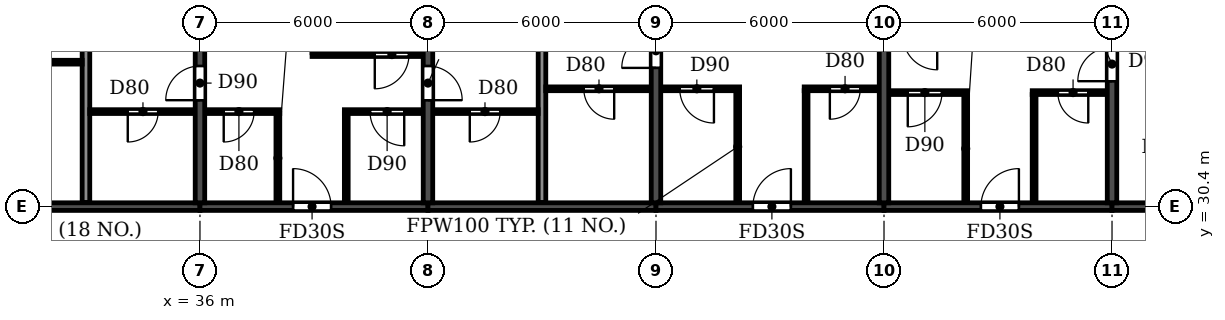
"""IFC4 building model, lengths in metres.
Left out: names, types, materials, properties, quantities, classifications, styles, units other than length and angle.
Written with IfcOpenShell. Run it as: python <this file> out.ifc"""

import sys

from ifc_helpers import new_model, si_unit, direction, frame, frame_2d, origin, place, context, subcontext, project, spatial, rectangle, extrude, element, fill, save


model = new_model("IFC4")
c1 = context("Model", 3, precision=1e-05, world=origin(), true_north=direction((0.0, 1.0)))
c2 = subcontext(c1, "Body", "Model", "MODEL_VIEW")
j1 = project(units=[si_unit("LENGTHUNIT", "METRE"), si_unit("PLANEANGLEUNIT", "RADIAN")], contexts=[c1])
p1 = place(None, origin())
s1 = spatial("IfcSite", under=j1, at=p1, CompositionType="ELEMENT")
p2 = place(p1, origin())
s2 = spatial("IfcBuilding", under=s1, at=p2, CompositionType="ELEMENT")
p3 = place(p2, frame((0.0, 0.0, 171.9)))
s3 = spatial("IfcBuildingStorey", under=s2, at=p3, CompositionType="ELEMENT", Elevation=171.9)
p4 = place(p3, frame((36.0, 30.5, 0.0), z_axis=(0.0, 0.0, 1.0), x_axis=(0.0, 1.0, 0.0)))
e1 = element("IfcWall", 1, at=p4, inside=s3, PredefinedType="SHEAR", context=c2, shape_type="SweptSolid", body=[
    extrude(rectangle(XDim=10.5, YDim=0.25, at=frame_2d((5.25, 0.0))), origin(), (0.0, 0.0, 1.0), 3.08),
])
p5 = place(p4, frame((2.7, 0.0, 0.0)))
e2 = element("IfcOpeningElement", 2, at=p5, cuts=e1, PredefinedType="OPENING", context=c2, shape_type="SweptSolid", body=[
    extrude(rectangle(XDim=0.9, YDim=2.1, at=frame_2d((0.45, 1.05))), frame((0.0, 0.135, 0.0), z_axis=(0.0, -1.0, 0.0), x_axis=(1.0, 0.0, 0.0)), (0.0, 0.0, 1.0), 0.27),
])
p6 = place(p3, frame((42.0, 30.5, 0.0), z_axis=(0.0, 0.0, 1.0), x_axis=(0.0, 1.0, 0.0)))
e3 = element("IfcWall", 3, at=p6, inside=s3, PredefinedType="SHEAR", context=c2, shape_type="SweptSolid", body=[
    extrude(rectangle(XDim=10.5, YDim=0.25, at=frame_2d((5.25, 0.0))), origin(), (0.0, 0.0, 1.0), 3.08),
])
p7 = place(p6, frame((2.7, 0.0, 0.0)))
e4 = element("IfcOpeningElement", 4, at=p7, cuts=e3, PredefinedType="OPENING", context=c2, shape_type="SweptSolid", body=[
    extrude(rectangle(XDim=0.9, YDim=2.1, at=frame_2d((0.45, 1.05))), frame((0.0, 0.135, 0.0), z_axis=(0.0, -1.0, 0.0), x_axis=(1.0, 0.0, 0.0)), (0.0, 0.0, 1.0), 0.27),
])
p8 = place(p3, frame((48.0, 30.5, 0.0), z_axis=(0.0, 0.0, 1.0), x_axis=(0.0, 1.0, 0.0)))
e5 = element("IfcWall", 5, at=p8, inside=s3, PredefinedType="SHEAR", context=c2, shape_type="SweptSolid", body=[
    extrude(rectangle(XDim=10.5, YDim=0.25, at=frame_2d((5.25, 0.0))), origin(), (0.0, 0.0, 1.0), 3.08),
])
p9 = place(p8, frame((3.55, 0.0, 0.0)))
e6 = element("IfcOpeningElement", 6, at=p9, cuts=e5, PredefinedType="OPENING", context=c2, shape_type="SweptSolid", body=[
    extrude(rectangle(XDim=0.9, YDim=2.1, at=frame_2d((0.45, 1.05))), frame((0.0, 0.135, 0.0), z_axis=(0.0, -1.0, 0.0), x_axis=(1.0, 0.0, 0.0)), (0.0, 0.0, 1.0), 0.27),
])
p10 = place(p3, frame((54.0, 30.5, 0.0), z_axis=(0.0, 0.0, 1.0), x_axis=(0.0, 1.0, 0.0)))
e7 = element("IfcWall", 7, at=p10, inside=s3, PredefinedType="SHEAR", context=c2, shape_type="SweptSolid", body=[
    extrude(rectangle(XDim=10.5, YDim=0.25, at=frame_2d((5.25, 0.0))), origin(), (0.0, 0.0, 1.0), 3.08),
])
p11 = place(p3, frame((60.0, 30.5, 0.0), z_axis=(0.0, 0.0, 1.0), x_axis=(0.0, 1.0, 0.0)))
e8 = element("IfcWall", 8, at=p11, inside=s3, PredefinedType="SHEAR", context=c2, shape_type="SweptSolid", body=[
    extrude(rectangle(XDim=10.5, YDim=0.25, at=frame_2d((5.25, 0.0))), origin(), (0.0, 0.0, 1.0), 3.08),
])
p12 = place(p11, frame((3.2, 0.0, 0.0)))
e9 = element("IfcOpeningElement", 9, at=p12, cuts=e8, PredefinedType="OPENING", context=c2, shape_type="SweptSolid", body=[
    extrude(rectangle(XDim=0.9, YDim=2.1, at=frame_2d((0.45, 1.05))), frame((0.0, 0.135, 0.0), z_axis=(0.0, -1.0, 0.0), x_axis=(1.0, 0.0, 0.0)), (0.0, 0.0, 1.0), 0.27),
])
p13 = place(p3, frame((30.0, 30.4, 0.0), z_axis=(0.0, 0.0, 1.0), x_axis=(1.0, 0.0, 0.0)))
e10 = element("IfcWall", 10, at=p13, inside=s3, PredefinedType="SHEAR", context=c2, shape_type="SweptSolid", body=[
    extrude(rectangle(XDim=6.0, YDim=0.2, at=frame_2d((3.0, 0.0))), origin(), (0.0, 0.0, 1.0), 2.48),
])
p14 = place(p3, frame((36.0, 30.4, 0.0), z_axis=(0.0, 0.0, 1.0), x_axis=(1.0, 0.0, 0.0)))
e11 = element("IfcWall", 11, at=p14, inside=s3, PredefinedType="SHEAR", context=c2, shape_type="SweptSolid", body=[
    extrude(rectangle(XDim=6.0, YDim=0.2, at=frame_2d((3.0, 0.0))), origin(), (0.0, 0.0, 1.0), 2.48),
])
p15 = place(p14, frame((2.45, 0.0, 0.0)))
e12 = element("IfcOpeningElement", 12, at=p15, cuts=e11, PredefinedType="OPENING", context=c2, shape_type="SweptSolid", body=[
    extrude(rectangle(XDim=1.0, YDim=2.1, at=frame_2d((0.5, 1.05))), frame((0.0, 0.11, 0.0), z_axis=(0.0, -1.0, 0.0), x_axis=(1.0, 0.0, 0.0)), (0.0, 0.0, 1.0), 0.22),
])
p16 = place(p3, frame((42.0, 30.4, 0.0), z_axis=(0.0, 0.0, 1.0), x_axis=(1.0, 0.0, 0.0)))
e13 = element("IfcWall", 13, at=p16, inside=s3, PredefinedType="SHEAR", context=c2, shape_type="SweptSolid", body=[
    extrude(rectangle(XDim=6.0, YDim=0.2, at=frame_2d((3.0, 0.0))), origin(), (0.0, 0.0, 1.0), 2.48),
])
p17 = place(p3, frame((48.0, 30.4, 0.0), z_axis=(0.0, 0.0, 1.0), x_axis=(1.0, 0.0, 0.0)))
e14 = element("IfcWall", 14, at=p17, inside=s3, PredefinedType="SHEAR", context=c2, shape_type="SweptSolid", body=[
    extrude(rectangle(XDim=6.0, YDim=0.2, at=frame_2d((3.0, 0.0))), origin(), (0.0, 0.0, 1.0), 2.48),
])
p18 = place(p17, frame((2.55, 0.0, 0.0)))
e15 = element("IfcOpeningElement", 15, at=p18, cuts=e14, PredefinedType="OPENING", context=c2, shape_type="SweptSolid", body=[
    extrude(rectangle(XDim=1.0, YDim=2.1, at=frame_2d((0.5, 1.05))), frame((0.0, 0.11, 0.0), z_axis=(0.0, -1.0, 0.0), x_axis=(1.0, 0.0, 0.0)), (0.0, 0.0, 1.0), 0.22),
])
p19 = place(p3, frame((54.0, 30.4, 0.0), z_axis=(0.0, 0.0, 1.0), x_axis=(1.0, 0.0, 0.0)))
e16 = element("IfcWall", 16, at=p19, inside=s3, PredefinedType="SHEAR", context=c2, shape_type="SweptSolid", body=[
    extrude(rectangle(XDim=6.0, YDim=0.2, at=frame_2d((3.0, 0.0))), origin(), (0.0, 0.0, 1.0), 2.48),
])
p20 = place(p19, frame((2.55, 0.0, 0.0)))
e17 = element("IfcOpeningElement", 17, at=p20, cuts=e16, PredefinedType="OPENING", context=c2, shape_type="SweptSolid", body=[
    extrude(rectangle(XDim=1.0, YDim=2.1, at=frame_2d((0.5, 1.05))), frame((0.0, 0.11, 0.0), z_axis=(0.0, -1.0, 0.0), x_axis=(1.0, 0.0, 0.0)), (0.0, 0.0, 1.0), 0.22),
])
p21 = place(p3, frame((60.0, 30.4, 0.0), z_axis=(0.0, 0.0, 1.0), x_axis=(1.0, 0.0, 0.0)))
e18 = element("IfcWall", 18, at=p21, inside=s3, PredefinedType="SHEAR", context=c2, shape_type="SweptSolid", body=[
    extrude(rectangle(XDim=6.0, YDim=0.2, at=frame_2d((3.0, 0.0))), origin(), (0.0, 0.0, 1.0), 2.48),
])
for number, where, z_axis, x_axis in (
    (19, (33.0, 30.51, 0.0), (0.0, 0.0, 1.0), (0.0, 1.0, 0.0)),
    (20, (45.0, 30.51, 0.0), (0.0, 0.0, 1.0), (0.0, 1.0, 0.0)),
):
    element("IfcWall", number, at=place(p3, frame(where, z_axis=z_axis, x_axis=x_axis)), inside=s3, PredefinedType="PARTITIONING", context=c2, shape_type="SweptSolid", body=[
        extrude(rectangle(XDim=10.63, YDim=0.2, at=frame_2d((5.315, 0.0))), origin(), (0.0, 0.0, 1.0), 3.08),
    ])
p22 = place(p3, frame((33.1, 32.9, 0.0), z_axis=(0.0, 0.0, 1.0), x_axis=(1.0, 0.0, 0.0)))
e21 = element("IfcWall", 21, at=p22, inside=s3, PredefinedType="PARTITIONING", context=c2, shape_type="SweptSolid", body=[
    extrude(rectangle(XDim=2.765, YDim=0.1, at=frame_2d((1.382, 0.0))), origin(), (0.0, 0.0, 1.0), 3.08),
])
p23 = place(p22, frame((1.0, 0.0, 0.0)))
e22 = element("IfcOpeningElement", 22, at=p23, cuts=e21, PredefinedType="OPENING", context=c2, shape_type="SweptSolid", body=[
    extrude(rectangle(XDim=0.8, YDim=2.1, at=frame_2d((0.4, 1.05))), frame((0.0, 0.06, 0.0), z_axis=(0.0, -1.0, 0.0), x_axis=(1.0, 0.0, 0.0)), (0.0, 0.0, 1.0), 0.12),
])
p24 = place(p3, frame((36.135, 32.9, 0.0), z_axis=(0.0, 0.0, 1.0), x_axis=(1.0, 0.0, 0.0)))
e23 = element("IfcWall", 23, at=p24, inside=s3, PredefinedType="PARTITIONING", context=c2, shape_type="SweptSolid", body=[
    extrude(rectangle(XDim=1.965, YDim=0.1, at=frame_2d((0.982, 0.0))), origin(), (0.0, 0.0, 1.0), 3.08),
])
p25 = place(p24, frame((0.49, 0.0, 0.0)))
e24 = element("IfcOpeningElement", 24, at=p25, cuts=e23, PredefinedType="OPENING", context=c2, shape_type="SweptSolid", body=[
    extrude(rectangle(XDim=0.8, YDim=2.1, at=frame_2d((0.4, 1.05))), frame((0.0, 0.06, 0.0), z_axis=(0.0, -1.0, 0.0), x_axis=(1.0, 0.0, 0.0)), (0.0, 0.0, 1.0), 0.12),
])
p26 = place(p3, frame((39.8, 32.9, 0.0), z_axis=(0.0, 0.0, 1.0), x_axis=(1.0, 0.0, 0.0)))
e25 = element("IfcWall", 25, at=p26, inside=s3, PredefinedType="PARTITIONING", context=c2, shape_type="SweptSolid", body=[
    extrude(rectangle(XDim=2.065, YDim=0.1, at=frame_2d((1.032, 0.0))), origin(), (0.0, 0.0, 1.0), 3.08),
])
p27 = place(p26, frame((0.675, 0.0, 0.0)))
e26 = element("IfcOpeningElement", 26, at=p27, cuts=e25, PredefinedType="OPENING", context=c2, shape_type="SweptSolid", body=[
    extrude(rectangle(XDim=0.9, YDim=2.1, at=frame_2d((0.45, 1.05))), frame((0.0, 0.06, 0.0), z_axis=(0.0, -1.0, 0.0), x_axis=(1.0, 0.0, 0.0)), (0.0, 0.0, 1.0), 0.12),
])
p28 = place(p3, frame((42.135, 32.9, 0.0), z_axis=(0.0, 0.0, 1.0), x_axis=(1.0, 0.0, 0.0)))
e27 = element("IfcWall", 27, at=p28, inside=s3, PredefinedType="PARTITIONING", context=c2, shape_type="SweptSolid", body=[
    extrude(rectangle(XDim=2.765, YDim=0.1, at=frame_2d((1.382, 0.0))), origin(), (0.0, 0.0, 1.0), 3.08),
])
p29 = place(p28, frame((0.965, 0.0, 0.0)))
e28 = element("IfcOpeningElement", 28, at=p29, cuts=e27, PredefinedType="OPENING", context=c2, shape_type="SweptSolid", body=[
    extrude(rectangle(XDim=0.8, YDim=2.1, at=frame_2d((0.4, 1.05))), frame((0.0, 0.06, 0.0), z_axis=(0.0, -1.0, 0.0), x_axis=(1.0, 0.0, 0.0)), (0.0, 0.0, 1.0), 0.12),
])
p30 = place(p3, frame((54.135, 33.4, 0.0), z_axis=(0.0, 0.0, 1.0), x_axis=(1.0, 0.0, 0.0)))
e29 = element("IfcWall", 29, at=p30, inside=s3, PredefinedType="PARTITIONING", context=c2, shape_type="SweptSolid", body=[
    extrude(rectangle(XDim=2.065, YDim=0.1, at=frame_2d((1.032, 0.0))), origin(), (0.0, 0.0, 1.0), 3.08),
])
p31 = place(p30, frame((0.49, 0.0, 0.0)))
e30 = element("IfcOpeningElement", 30, at=p31, cuts=e29, PredefinedType="OPENING", context=c2, shape_type="SweptSolid", body=[
    extrude(rectangle(XDim=0.9, YDim=2.1, at=frame_2d((0.45, 1.05))), frame((0.0, 0.06, 0.0), z_axis=(0.0, -1.0, 0.0), x_axis=(1.0, 0.0, 0.0)), (0.0, 0.0, 1.0), 0.12),
])
p32 = place(p3, frame((57.9, 33.4, 0.0), z_axis=(0.0, 0.0, 1.0), x_axis=(1.0, 0.0, 0.0)))
e31 = element("IfcWall", 31, at=p32, inside=s3, PredefinedType="PARTITIONING", context=c2, shape_type="SweptSolid", body=[
    extrude(rectangle(XDim=1.965, YDim=0.1, at=frame_2d((0.982, 0.0))), origin(), (0.0, 0.0, 1.0), 3.08),
])
p33 = place(p32, frame((0.675, 0.0, 0.0)))
e32 = element("IfcOpeningElement", 32, at=p33, cuts=e31, PredefinedType="OPENING", context=c2, shape_type="SweptSolid", body=[
    extrude(rectangle(XDim=0.8, YDim=2.1, at=frame_2d((0.4, 1.05))), frame((0.0, 0.06, 0.0), z_axis=(0.0, -1.0, 0.0), x_axis=(1.0, 0.0, 0.0)), (0.0, 0.0, 1.0), 0.12),
])
p34 = place(p3, frame((45.1, 33.5, 0.0), z_axis=(0.0, 0.0, 1.0), x_axis=(1.0, 0.0, 0.0)))
e33 = element("IfcWall", 33, at=p34, inside=s3, PredefinedType="PARTITIONING", context=c2, shape_type="SweptSolid", body=[
    extrude(rectangle(XDim=2.765, YDim=0.1, at=frame_2d((1.382, 0.0))), origin(), (0.0, 0.0, 1.0), 3.08),
])
p35 = place(p34, frame((1.0, 0.0, 0.0)))
e34 = element("IfcOpeningElement", 34, at=p35, cuts=e33, PredefinedType="OPENING", context=c2, shape_type="SweptSolid", body=[
    extrude(rectangle(XDim=0.8, YDim=2.1, at=frame_2d((0.4, 1.05))), frame((0.0, 0.06, 0.0), z_axis=(0.0, -1.0, 0.0), x_axis=(1.0, 0.0, 0.0)), (0.0, 0.0, 1.0), 0.12),
])
p36 = place(p3, frame((48.135, 33.5, 0.0), z_axis=(0.0, 0.0, 1.0), x_axis=(1.0, 0.0, 0.0)))
e35 = element("IfcWall", 35, at=p36, inside=s3, PredefinedType="PARTITIONING", context=c2, shape_type="SweptSolid", body=[
    extrude(rectangle(XDim=2.065, YDim=0.1, at=frame_2d((1.032, 0.0))), origin(), (0.0, 0.0, 1.0), 3.08),
])
p37 = place(p36, frame((0.49, 0.0, 0.0)))
e36 = element("IfcOpeningElement", 36, at=p37, cuts=e35, PredefinedType="OPENING", context=c2, shape_type="SweptSolid", body=[
    extrude(rectangle(XDim=0.9, YDim=2.1, at=frame_2d((0.45, 1.05))), frame((0.0, 0.06, 0.0), z_axis=(0.0, -1.0, 0.0), x_axis=(1.0, 0.0, 0.0)), (0.0, 0.0, 1.0), 0.12),
])
p38 = place(p3, frame((51.9, 33.5, 0.0), z_axis=(0.0, 0.0, 1.0), x_axis=(1.0, 0.0, 0.0)))
e37 = element("IfcWall", 37, at=p38, inside=s3, PredefinedType="PARTITIONING", context=c2, shape_type="SweptSolid", body=[
    extrude(rectangle(XDim=1.965, YDim=0.1, at=frame_2d((0.982, 0.0))), origin(), (0.0, 0.0, 1.0), 3.08),
])
p39 = place(p38, frame((0.675, 0.0, 0.0)))
e38 = element("IfcOpeningElement", 38, at=p39, cuts=e37, PredefinedType="OPENING", context=c2, shape_type="SweptSolid", body=[
    extrude(rectangle(XDim=0.8, YDim=2.1, at=frame_2d((0.4, 1.05))), frame((0.0, 0.06, 0.0), z_axis=(0.0, -1.0, 0.0), x_axis=(1.0, 0.0, 0.0)), (0.0, 0.0, 1.0), 0.12),
])
p40 = place(p3, frame((30.135, 34.2, 0.0), z_axis=(0.0, 0.0, 1.0), x_axis=(1.0, 0.0, 0.0)))
e39 = element("IfcWall", 39, at=p40, inside=s3, PredefinedType="PARTITIONING", context=c2, shape_type="SweptSolid", body=[
    extrude(rectangle(XDim=2.765, YDim=0.1, at=frame_2d((1.382, 0.0))), origin(), (0.0, 0.0, 1.0), 3.08),
])
p41 = place(p40, frame((0.965, 0.0, 0.0)))
e40 = element("IfcOpeningElement", 40, at=p41, cuts=e39, PredefinedType="OPENING", context=c2, shape_type="SweptSolid", body=[
    extrude(rectangle(XDim=0.8, YDim=2.1, at=frame_2d((0.4, 1.05))), frame((0.0, 0.06, 0.0), z_axis=(0.0, -1.0, 0.0), x_axis=(1.0, 0.0, 0.0)), (0.0, 0.0, 1.0), 0.12),
])
p42 = place(p3, frame((38.95, 34.4, 0.0), z_axis=(0.0, 0.0, 1.0), x_axis=(1.0, 0.0, 0.0)))
e41 = element("IfcWall", 41, at=p42, inside=s3, PredefinedType="PARTITIONING", context=c2, shape_type="SweptSolid", body=[
    extrude(rectangle(XDim=2.915, YDim=0.1, at=frame_2d((1.458, 0.0))), origin(), (0.0, 0.0, 1.0), 3.08),
])
p43 = place(p42, frame((1.65, 0.0, 0.0)))
e42 = element("IfcOpeningElement", 42, at=p43, cuts=e41, PredefinedType="OPENING", context=c2, shape_type="SweptSolid", body=[
    extrude(rectangle(XDim=0.9, YDim=2.1, at=frame_2d((0.45, 1.05))), frame((0.0, 0.06, 0.0), z_axis=(0.0, -1.0, 0.0), x_axis=(1.0, 0.0, 0.0)), (0.0, 0.0, 1.0), 0.12),
])
for number, where, z_axis, x_axis in (
    (43, (38.05, 30.51, 0.0), (0.0, 0.0, 1.0), (0.0, 1.0, 0.0)),
    (44, (39.85, 30.51, 0.0), (0.0, 0.0, 1.0), (0.0, 1.0, 0.0)),
):
    element("IfcWall", number, at=place(p3, frame(where, z_axis=z_axis, x_axis=x_axis)), inside=s3, PredefinedType="PARTITIONING", context=c2, shape_type="SweptSolid", body=[
        extrude(rectangle(XDim=2.34, YDim=0.1, at=frame_2d((1.17, 0.0))), origin(), (0.0, 0.0, 1.0), 3.08),
    ])
for number, where, z_axis, x_axis in (
    (45, (50.15, 30.51, 0.0), (0.0, 0.0, 1.0), (0.0, 1.0, 0.0)),
    (46, (51.95, 30.51, 0.0), (0.0, 0.0, 1.0), (0.0, 1.0, 0.0)),
):
    element("IfcWall", number, at=place(p3, frame(where, z_axis=z_axis, x_axis=x_axis)), inside=s3, PredefinedType="PARTITIONING", context=c2, shape_type="SweptSolid", body=[
        extrude(rectangle(XDim=2.94, YDim=0.1, at=frame_2d((1.47, 0.0))), origin(), (0.0, 0.0, 1.0), 3.08),
    ])
for number, where, z_axis, x_axis in (
    (47, (56.15, 30.51, 0.0), (0.0, 0.0, 1.0), (0.0, 1.0, 0.0)),
    (48, (57.95, 30.51, 0.0), (0.0, 0.0, 1.0), (0.0, 1.0, 0.0)),
):
    element("IfcWall", number, at=place(p3, frame(where, z_axis=z_axis, x_axis=x_axis)), inside=s3, PredefinedType="PARTITIONING", context=c2, shape_type="SweptSolid", body=[
        extrude(rectangle(XDim=2.84, YDim=0.1, at=frame_2d((1.42, 0.0))), origin(), (0.0, 0.0, 1.0), 3.08),
    ])
p44 = place(p23, frame((0.8, 0.0, 0.0), z_axis=(0.0, 0.0, 1.0), x_axis=(-1.0, 0.0, 0.0)))
e49 = element("IfcDoor", 49, at=p44, inside=s3, OperationType="SINGLE_SWING_RIGHT", PredefinedType="DOOR", context=c2, shape_type="SweptSolid", body=[
    extrude(rectangle(XDim=0.8, YDim=2.1, at=frame_2d((0.4, 1.05))), frame((0.0, 0.025, 0.0), z_axis=(0.0, -1.0, 0.0), x_axis=(1.0, 0.0, 0.0)), (0.0, 0.0, 1.0), 0.05),
])
fill(e22, e49)
p45 = place(p29, frame((0.8, 0.0, 0.0), z_axis=(0.0, 0.0, 1.0), x_axis=(-1.0, 0.0, 0.0)))
e50 = element("IfcDoor", 50, at=p45, inside=s3, OperationType="SINGLE_SWING_RIGHT", PredefinedType="DOOR", context=c2, shape_type="SweptSolid", body=[
    extrude(rectangle(XDim=0.8, YDim=2.1, at=frame_2d((0.4, 1.05))), frame((0.0, 0.025, 0.0), z_axis=(0.0, -1.0, 0.0), x_axis=(1.0, 0.0, 0.0)), (0.0, 0.0, 1.0), 0.05),
])
fill(e28, e50)
p46 = place(p5, origin())
e51 = element("IfcDoor", 51, at=p46, inside=s3, OperationType="SINGLE_SWING_LEFT", PredefinedType="DOOR", context=c2, shape_type="SweptSolid", body=[
    extrude(rectangle(XDim=0.9, YDim=2.1, at=frame_2d((0.45, 1.05))), frame((0.0, 0.025, 0.0), z_axis=(0.0, -1.0, 0.0), x_axis=(1.0, 0.0, 0.0)), (0.0, 0.0, 1.0), 0.05),
])
fill(e2, e51)
p47 = place(p25, frame((0.8, 0.0, 0.0), z_axis=(0.0, 0.0, 1.0), x_axis=(-1.0, 0.0, 0.0)))
e52 = element("IfcDoor", 52, at=p47, inside=s3, OperationType="SINGLE_SWING_RIGHT", PredefinedType="DOOR", context=c2, shape_type="SweptSolid", body=[
    extrude(rectangle(XDim=0.8, YDim=2.1, at=frame_2d((0.4, 1.05))), frame((0.0, 0.025, 0.0), z_axis=(0.0, -1.0, 0.0), x_axis=(1.0, 0.0, 0.0)), (0.0, 0.0, 1.0), 0.05),
])
fill(e24, e52)
p48 = place(p15, origin())
e53 = element("IfcDoor", 53, at=p48, inside=s3, OperationType="SINGLE_SWING_LEFT", PredefinedType="DOOR", context=c2, shape_type="SweptSolid", body=[
    extrude(rectangle(XDim=1.0, YDim=2.1, at=frame_2d((0.5, 1.05))), frame((0.0, 0.025, 0.0), z_axis=(0.0, -1.0, 0.0), x_axis=(1.0, 0.0, 0.0)), (0.0, 0.0, 1.0), 0.05),
])
fill(e12, e53)
p49 = place(p27, frame((0.9, 0.0, 0.0), z_axis=(0.0, 0.0, 1.0), x_axis=(-1.0, 0.0, 0.0)))
e54 = element("IfcDoor", 54, at=p49, inside=s3, OperationType="SINGLE_SWING_LEFT", PredefinedType="DOOR", context=c2, shape_type="SweptSolid", body=[
    extrude(rectangle(XDim=0.9, YDim=2.1, at=frame_2d((0.45, 1.05))), frame((0.0, 0.025, 0.0), z_axis=(0.0, -1.0, 0.0), x_axis=(1.0, 0.0, 0.0)), (0.0, 0.0, 1.0), 0.05),
])
fill(e26, e54)
p50 = place(p43, frame((0.9, 0.0, 0.0), z_axis=(0.0, 0.0, 1.0), x_axis=(-1.0, 0.0, 0.0)))
e55 = element("IfcDoor", 55, at=p50, inside=s3, OperationType="SINGLE_SWING_RIGHT", PredefinedType="DOOR", context=c2, shape_type="SweptSolid", body=[
    extrude(rectangle(XDim=0.9, YDim=2.1, at=frame_2d((0.45, 1.05))), frame((0.0, 0.025, 0.0), z_axis=(0.0, -1.0, 0.0), x_axis=(1.0, 0.0, 0.0)), (0.0, 0.0, 1.0), 0.05),
])
fill(e42, e55)
p51 = place(p7, frame((0.9, 0.0, 0.0), z_axis=(0.0, 0.0, 1.0), x_axis=(-1.0, 0.0, 0.0)))
e56 = element("IfcDoor", 56, at=p51, inside=s3, OperationType="SINGLE_SWING_RIGHT", PredefinedType="DOOR", context=c2, shape_type="SweptSolid", body=[
    extrude(rectangle(XDim=0.9, YDim=2.1, at=frame_2d((0.45, 1.05))), frame((0.0, 0.025, 0.0), z_axis=(0.0, -1.0, 0.0), x_axis=(1.0, 0.0, 0.0)), (0.0, 0.0, 1.0), 0.05),
])
fill(e4, e56)
p52 = place(p35, frame((0.8, 0.0, 0.0), z_axis=(0.0, 0.0, 1.0), x_axis=(-1.0, 0.0, 0.0)))
e57 = element("IfcDoor", 57, at=p52, inside=s3, OperationType="SINGLE_SWING_LEFT", PredefinedType="DOOR", context=c2, shape_type="SweptSolid", body=[
    extrude(rectangle(XDim=0.8, YDim=2.1, at=frame_2d((0.4, 1.05))), frame((0.0, 0.025, 0.0), z_axis=(0.0, -1.0, 0.0), x_axis=(1.0, 0.0, 0.0)), (0.0, 0.0, 1.0), 0.05),
])
fill(e34, e57)
p53 = place(p9, origin())
e58 = element("IfcDoor", 58, at=p53, inside=s3, OperationType="SINGLE_SWING_LEFT", PredefinedType="DOOR", context=c2, shape_type="SweptSolid", body=[
    extrude(rectangle(XDim=0.9, YDim=2.1, at=frame_2d((0.45, 1.05))), frame((0.0, 0.025, 0.0), z_axis=(0.0, -1.0, 0.0), x_axis=(1.0, 0.0, 0.0)), (0.0, 0.0, 1.0), 0.05),
])
fill(e6, e58)
p54 = place(p37, frame((0.9, 0.0, 0.0), z_axis=(0.0, 0.0, 1.0), x_axis=(-1.0, 0.0, 0.0)))
e59 = element("IfcDoor", 59, at=p54, inside=s3, OperationType="SINGLE_SWING_LEFT", PredefinedType="DOOR", context=c2, shape_type="SweptSolid", body=[
    extrude(rectangle(XDim=0.9, YDim=2.1, at=frame_2d((0.45, 1.05))), frame((0.0, 0.025, 0.0), z_axis=(0.0, -1.0, 0.0), x_axis=(1.0, 0.0, 0.0)), (0.0, 0.0, 1.0), 0.05),
])
fill(e36, e59)
p55 = place(p18, origin())
e60 = element("IfcDoor", 60, at=p55, inside=s3, OperationType="SINGLE_SWING_RIGHT", PredefinedType="DOOR", context=c2, shape_type="SweptSolid", body=[
    extrude(rectangle(XDim=1.0, YDim=2.1, at=frame_2d((0.5, 1.05))), frame((0.0, 0.025, 0.0), z_axis=(0.0, -1.0, 0.0), x_axis=(1.0, 0.0, 0.0)), (0.0, 0.0, 1.0), 0.05),
])
fill(e15, e60)
p56 = place(p39, frame((0.8, 0.0, 0.0), z_axis=(0.0, 0.0, 1.0), x_axis=(-1.0, 0.0, 0.0)))
e61 = element("IfcDoor", 61, at=p56, inside=s3, OperationType="SINGLE_SWING_RIGHT", PredefinedType="DOOR", context=c2, shape_type="SweptSolid", body=[
    extrude(rectangle(XDim=0.8, YDim=2.1, at=frame_2d((0.4, 1.05))), frame((0.0, 0.025, 0.0), z_axis=(0.0, -1.0, 0.0), x_axis=(1.0, 0.0, 0.0)), (0.0, 0.0, 1.0), 0.05),
])
fill(e38, e61)
p57 = place(p31, frame((0.9, 0.0, 0.0), z_axis=(0.0, 0.0, 1.0), x_axis=(-1.0, 0.0, 0.0)))
e62 = element("IfcDoor", 62, at=p57, inside=s3, OperationType="SINGLE_SWING_RIGHT", PredefinedType="DOOR", context=c2, shape_type="SweptSolid", body=[
    extrude(rectangle(XDim=0.9, YDim=2.1, at=frame_2d((0.45, 1.05))), frame((0.0, 0.025, 0.0), z_axis=(0.0, -1.0, 0.0), x_axis=(1.0, 0.0, 0.0)), (0.0, 0.0, 1.0), 0.05),
])
fill(e30, e62)
p58 = place(p20, origin())
e63 = element("IfcDoor", 63, at=p58, inside=s3, OperationType="SINGLE_SWING_RIGHT", PredefinedType="DOOR", context=c2, shape_type="SweptSolid", body=[
    extrude(rectangle(XDim=1.0, YDim=2.1, at=frame_2d((0.5, 1.05))), frame((0.0, 0.025, 0.0), z_axis=(0.0, -1.0, 0.0), x_axis=(1.0, 0.0, 0.0)), (0.0, 0.0, 1.0), 0.05),
])
fill(e17, e63)
p59 = place(p33, frame((0.8, 0.0, 0.0), z_axis=(0.0, 0.0, 1.0), x_axis=(-1.0, 0.0, 0.0)))
e64 = element("IfcDoor", 64, at=p59, inside=s3, OperationType="SINGLE_SWING_LEFT", PredefinedType="DOOR", context=c2, shape_type="SweptSolid", body=[
    extrude(rectangle(XDim=0.8, YDim=2.1, at=frame_2d((0.4, 1.05))), frame((0.0, 0.025, 0.0), z_axis=(0.0, -1.0, 0.0), x_axis=(1.0, 0.0, 0.0)), (0.0, 0.0, 1.0), 0.05),
])
fill(e32, e64)
p60 = place(p12, origin())
e65 = element("IfcDoor", 65, at=p60, inside=s3, OperationType="SINGLE_SWING_LEFT", PredefinedType="DOOR", context=c2, shape_type="SweptSolid", body=[
    extrude(rectangle(XDim=0.9, YDim=2.1, at=frame_2d((0.45, 1.05))), frame((0.0, 0.025, 0.0), z_axis=(0.0, -1.0, 0.0), x_axis=(1.0, 0.0, 0.0)), (0.0, 0.0, 1.0), 0.05),
])
fill(e9, e65)
save(model, sys.argv[1])
